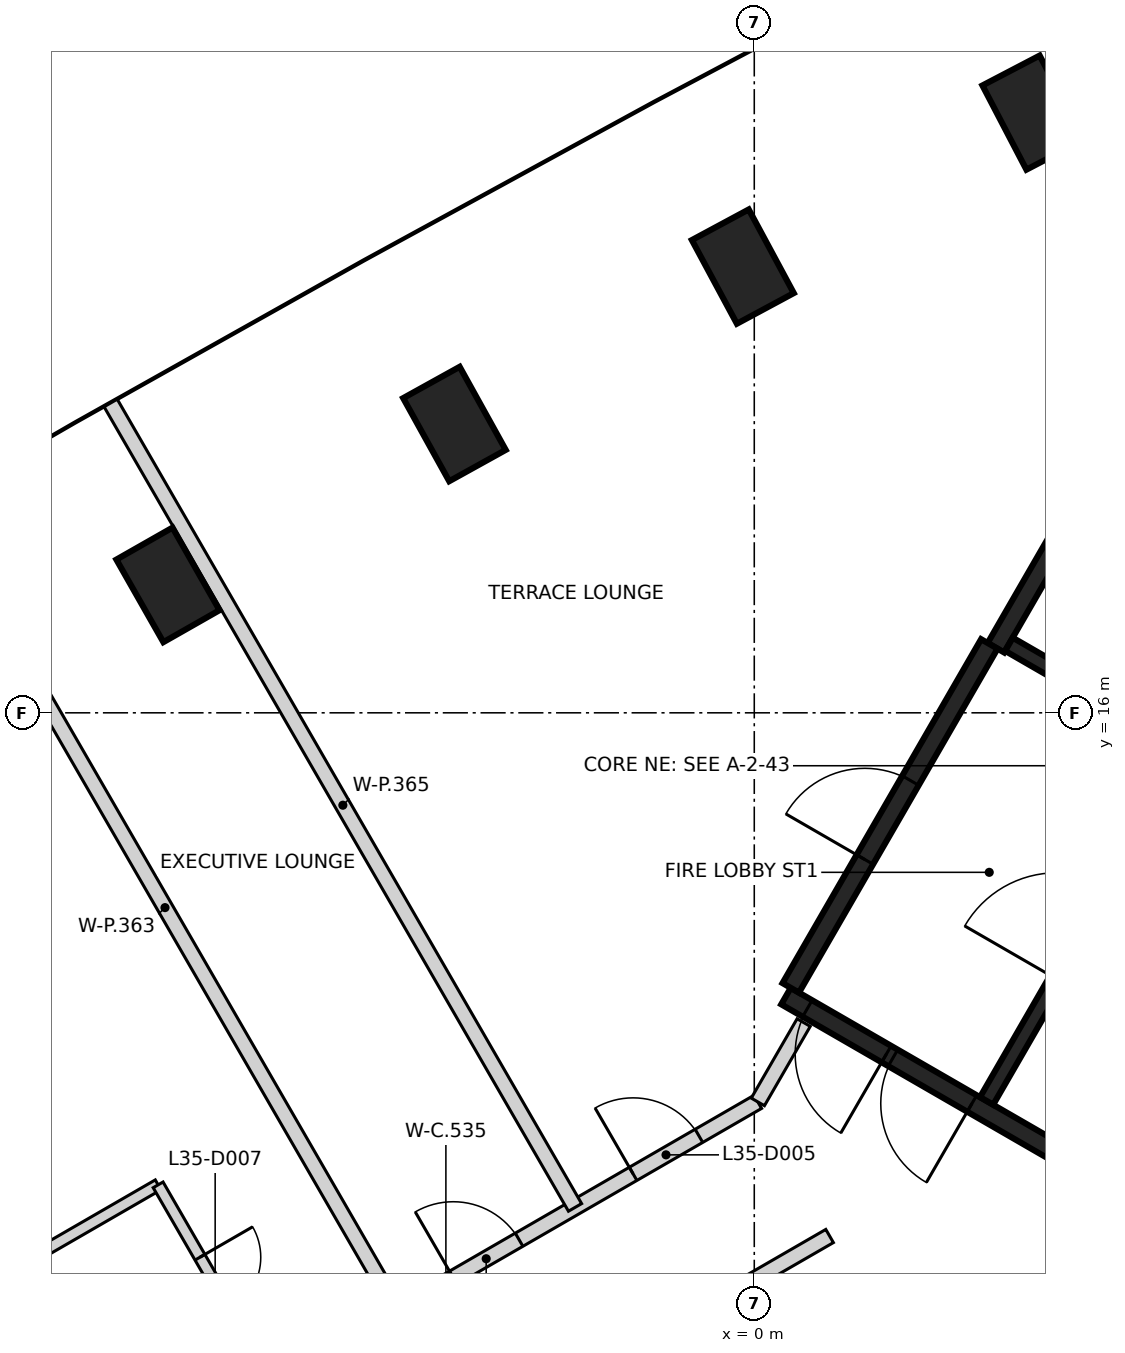
"""IFC4 building model, lengths in metres.
Left out: names, types, materials, properties, quantities, classifications, styles, units other than length and angle.
Written with IfcOpenShell. Run it as: python <this file> out.ifc"""

import sys

from ifc_helpers import new_model, si_unit, direction, frame, frame_2d, origin, origin_2d, place, context, subcontext, project, spatial, rectangle, extrude, element, fill, save


model = new_model("IFC4")
c1 = context("Model", 3, precision=1e-05, world=origin(), true_north=direction((0.0, 1.0)))
c2 = subcontext(c1, "Body", "Model", "MODEL_VIEW")
j1 = project(units=[si_unit("LENGTHUNIT", "METRE"), si_unit("PLANEANGLEUNIT", "RADIAN")], contexts=[c1])
p1 = place(None, origin())
s1 = spatial("IfcSite", under=j1, at=p1, CompositionType="ELEMENT")
p2 = place(p1, origin())
s2 = spatial("IfcBuilding", under=s1, at=p2, CompositionType="ELEMENT")
p3 = place(p2, frame((0.0, 0.0, 143.2)))
s3 = spatial("IfcBuildingStorey", under=s2, at=p3, CompositionType="ELEMENT", Elevation=143.2)
for number, where, z_axis, x_axis in (
    (1, (3.667, 23.896, -0.4), (0.0, 0.0, 1.0), (-0.463, 0.886, 0.0)),
    (2, (-0.151, 21.871, -0.4), (0.0, 0.0, 1.0), (-0.474, 0.881, 0.0)),
    (3, (-3.945, 19.8, -0.4), (0.0, 0.0, 1.0), (-0.485, 0.875, 0.0)),
    (4, (-7.714, 17.683, -0.4), (0.0, 0.0, 1.0), (-0.495, 0.869, 0.0)),
):
    element("IfcColumn", number, at=place(p3, frame(where, z_axis=z_axis, x_axis=x_axis)), inside=s3, PredefinedType="COLUMN", context=c2, shape_type="SweptSolid", body=[
        extrude(rectangle(XDim=1.25, YDim=0.85, at=origin_2d()), origin(), (0.0, 0.0, 1.0), 3.6),
    ])
p4 = place(p3, frame((10.42, 6.498, 0.0), z_axis=(0.0, 0.0, 1.0), x_axis=(-0.866021906294, 0.500006057782, 0.0)))
e5 = element("IfcWall", 5, at=p4, inside=s3, PredefinedType="SHEAR", context=c2, shape_type="SweptSolid", body=[
    extrude(rectangle(XDim=11.55, YDim=0.25, at=frame_2d((5.775, 0.0))), origin(), (0.0, 0.0, 1.0), 3.2),
])
p5 = place(p4, frame((10.025, 0.0, 0.0)))
e6 = element("IfcOpeningElement", 6, at=p5, cuts=e5, PredefinedType="OPENING", context=c2, shape_type="SweptSolid", body=[
    extrude(rectangle(XDim=1.2, YDim=2.1, at=frame_2d((0.6, 1.05))), frame((0.0, 0.135, 0.0), z_axis=(0.0, -1.0, 0.0), x_axis=(1.0, 0.0, 0.0)), (0.0, 0.0, 1.0), 0.27),
])
p6 = place(p4, frame((8.725, 0.0, 0.0)))
e7 = element("IfcOpeningElement", 7, at=p6, cuts=e5, PredefinedType="OPENING", context=c2, shape_type="SweptSolid", body=[
    extrude(rectangle(XDim=1.2, YDim=2.1, at=frame_2d((0.6, 1.05))), frame((0.0, 0.135, 0.0), z_axis=(0.0, -1.0, 0.0), x_axis=(1.0, 0.0, 0.0)), (0.0, 0.0, 1.0), 0.27),
])
p7 = place(p3, frame((3.179, 16.856, 0.0), z_axis=(0.0, 0.0, 1.0), x_axis=(0.500004234368, 0.866022959057, 0.0)))
e8 = element("IfcWall", 8, at=p7, inside=s3, PredefinedType="SHEAR", context=c2, shape_type="SweptSolid", body=[
    extrude(rectangle(XDim=6.25, YDim=0.25, at=frame_2d((3.125, 0.0))), origin(), (0.0, 0.0, 1.0), 3.2),
])
p8 = place(p3, frame((0.48, 12.381, 0.0), z_axis=(0.0, 0.0, 1.0), x_axis=(0.49999885962, 0.866026062182, 0.0)))
e9 = element("IfcWall", 9, at=p8, inside=s3, PredefinedType="SHEAR", context=c2, shape_type="SweptSolid", body=[
    extrude(rectangle(XDim=5.225, YDim=0.25, at=frame_2d((2.612, 0.0))), origin(), (0.0, 0.0, 1.0), 3.2),
])
p9 = place(p8, frame((1.95, 0.0, 0.0)))
e10 = element("IfcOpeningElement", 10, at=p9, cuts=e9, PredefinedType="OPENING", context=c2, shape_type="SweptSolid", body=[
    extrude(rectangle(XDim=1.2, YDim=2.1, at=frame_2d((0.6, 1.05))), frame((0.0, 0.135, 0.0), z_axis=(0.0, -1.0, 0.0), x_axis=(1.0, 0.0, 0.0)), (0.0, 0.0, 1.0), 0.27),
])
p10 = place(p3, frame((3.057, 10.895, 0.0), z_axis=(0.0, 0.0, 1.0), x_axis=(0.499989418164, 0.866031513124, 0.0)))
e11 = element("IfcWall", 11, at=p10, inside=s3, PredefinedType="SHEAR", context=c2, shape_type="SweptSolid", body=[
    extrude(rectangle(XDim=5.251, YDim=0.2, at=frame_2d((2.625, 0.0))), origin(), (0.0, 0.0, 1.0), 3.2),
])
p11 = place(p10, frame((1.849, 0.0, 0.0)))
e12 = element("IfcOpeningElement", 12, at=p11, cuts=e11, PredefinedType="OPENING", context=c2, shape_type="SweptSolid", body=[
    extrude(rectangle(XDim=1.4, YDim=2.1, at=frame_2d((0.7, 1.05))), frame((0.0, 0.11, 0.0), z_axis=(0.0, -1.0, 0.0), x_axis=(1.0, 0.0, 0.0)), (0.0, 0.0, 1.0), 0.22),
])
p12 = place(p3, frame((5.725, 15.531, 0.0), z_axis=(0.0, 0.0, 1.0), x_axis=(-0.866037306777, 0.499979382845, 0.0)))
e13 = element("IfcWall", 13, at=p12, inside=s3, PredefinedType="SHEAR", context=c2, shape_type="SweptSolid", body=[
    extrude(rectangle(XDim=2.742, YDim=0.2, at=frame_2d((1.371, 0.0))), origin(), (0.0, 0.0, 1.0), 3.2),
])
p13 = place(p12, frame((0.743, 0.0, 0.0)))
e14 = element("IfcOpeningElement", 14, at=p13, cuts=e13, PredefinedType="OPENING", context=c2, shape_type="SweptSolid", body=[
    extrude(rectangle(XDim=1.3, YDim=2.1, at=frame_2d((0.65, 1.05))), frame((0.0, 0.11, 0.0), z_axis=(0.0, -1.0, 0.0), x_axis=(1.0, 0.0, 0.0)), (0.0, 0.0, 1.0), 0.22),
])
p14 = place(p3, frame((-16.026, 10.245, 0.0), z_axis=(0.0, 0.0, 1.0), x_axis=(0.937607706988, -0.347694963721, 0.0)))
e15 = element("IfcWall", 15, at=p14, inside=s3, PredefinedType="PARTITIONING", context=c2, shape_type="SweptSolid", body=[
    extrude(rectangle(XDim=7.458, YDim=0.2, at=frame_2d((3.729, 0.0))), origin(), (0.0, 0.0, 1.0), 3.2),
])
p15 = place(p14, frame((6.179, 0.0, 0.0)))
e16 = element("IfcOpeningElement", 16, at=p15, cuts=e15, PredefinedType="OPENING", context=c2, shape_type="SweptSolid", body=[
    extrude(rectangle(XDim=0.95, YDim=2.1, at=frame_2d((0.475, 1.05))), frame((0.0, 0.11, 0.0), z_axis=(0.0, -1.0, 0.0), x_axis=(1.0, 0.0, 0.0)), (0.0, 0.0, 1.0), 0.22),
])
p16 = place(p14, frame((2.139, 0.0, 0.0)))
e17 = element("IfcOpeningElement", 17, at=p16, cuts=e15, PredefinedType="OPENING", context=c2, shape_type="SweptSolid", body=[
    extrude(rectangle(XDim=1.0, YDim=2.1, at=frame_2d((0.5, 1.05))), frame((0.0, 0.11, 0.0), z_axis=(0.0, -1.0, 0.0), x_axis=(1.0, 0.0, 0.0)), (0.0, 0.0, 1.0), 0.22),
])
p17 = place(p3, frame((-8.382, 3.705, 0.0), z_axis=(0.0, 0.0, 1.0), x_axis=(0.866012036978, 0.500023151273, 0.0)))
e18 = element("IfcWall", 18, at=p17, inside=s3, PredefinedType="PARTITIONING", context=c2, shape_type="SweptSolid", body=[
    extrude(rectangle(XDim=10.823, YDim=0.2, at=frame_2d((5.412, 0.0))), origin(), (0.0, 0.0, 1.0), 3.2),
])
p18 = place(p17, frame((7.661, 0.0, 0.0)))
e19 = element("IfcOpeningElement", 19, at=p18, cuts=e18, PredefinedType="OPENING", context=c2, shape_type="SweptSolid", body=[
    extrude(rectangle(XDim=0.9, YDim=2.1, at=frame_2d((0.45, 1.05))), frame((0.0, 0.11, 0.0), z_axis=(0.0, -1.0, 0.0), x_axis=(1.0, 0.0, 0.0)), (0.0, 0.0, 1.0), 0.22),
])
p19 = place(p17, frame((2.261, 0.0, 0.0)))
e20 = element("IfcOpeningElement", 20, at=p19, cuts=e18, PredefinedType="OPENING", context=c2, shape_type="SweptSolid", body=[
    extrude(rectangle(XDim=0.9, YDim=2.1, at=frame_2d((0.45, 1.05))), frame((0.0, 0.11, 0.0), z_axis=(0.0, -1.0, 0.0), x_axis=(1.0, 0.0, 0.0)), (0.0, 0.0, 1.0), 0.22),
])
p20 = place(p3, frame((-8.161, 6.142, 0.0), z_axis=(0.0, 0.0, 1.0), x_axis=(0.865927304867, 0.500169873828, 0.0)))
e21 = element("IfcWall", 21, at=p20, inside=s3, PredefinedType="PARTITIONING", context=c2, shape_type="SweptSolid", body=[
    extrude(rectangle(XDim=9.478, YDim=0.2, at=frame_2d((4.739, 0.0))), origin(), (0.0, 0.0, 1.0), 3.2),
])
p21 = place(p20, frame((4.851, 0.0, 0.0)))
e22 = element("IfcOpeningElement", 22, at=p21, cuts=e21, PredefinedType="OPENING", context=c2, shape_type="SweptSolid", body=[
    extrude(rectangle(XDim=1.0, YDim=2.1, at=frame_2d((0.5, 1.05))), frame((0.0, 0.11, 0.0), z_axis=(0.0, -1.0, 0.0), x_axis=(1.0, 0.0, 0.0)), (0.0, 0.0, 1.0), 0.22),
])
p22 = place(p20, frame((7.583, 0.0, 0.0)))
e23 = element("IfcOpeningElement", 23, at=p22, cuts=e21, PredefinedType="OPENING", context=c2, shape_type="SweptSolid", body=[
    extrude(rectangle(XDim=1.0, YDim=2.1, at=frame_2d((0.5, 1.05))), frame((0.0, 0.11, 0.0), z_axis=(0.0, -1.0, 0.0), x_axis=(1.0, 0.0, 0.0)), (0.0, 0.0, 1.0), 0.22),
])
p23 = place(p3, frame((0.047, 10.881, 0.0), z_axis=(0.0, 0.0, 1.0), x_axis=(0.500038011057, 0.866003456978, 0.0)))
e24 = element("IfcWall", 24, at=p23, inside=s3, PredefinedType="PARTITIONING", context=c2, shape_type="SweptSolid", body=[
    extrude(rectangle(XDim=1.206, YDim=0.2, at=frame_2d((0.603, 0.0))), origin(), (0.0, 0.0, 1.0), 3.2),
])
p24 = place(p3, frame((-10.809, 18.731, 0.0), z_axis=(0.0, 0.0, 1.0), x_axis=(0.500004774777, -0.866022647048, 0.0)))
e25 = element("IfcWall", 25, at=p24, inside=s3, PredefinedType="PARTITIONING", context=c2, shape_type="SweptSolid", body=[
    extrude(rectangle(XDim=12.227, YDim=0.2, at=frame_2d((6.113, 0.0))), origin(), (0.0, 0.0, 1.0), 2.3),
])
p25 = place(p3, frame((-8.468, 20.076, 0.0), z_axis=(0.0, 0.0, 1.0), x_axis=(0.499961688474, -0.866047521824, 0.0)))
e26 = element("IfcWall", 26, at=p25, inside=s3, PredefinedType="PARTITIONING", context=c2, shape_type="SweptSolid", body=[
    extrude(rectangle(XDim=12.22, YDim=0.2, at=frame_2d((6.11, 0.0))), origin(), (0.0, 0.0, 1.0), 2.3),
])
p26 = place(p3, frame((-9.661, 8.74, 0.0), z_axis=(0.0, 0.0, 1.0), x_axis=(0.49990192124, -0.866082022179, 0.0)))
e27 = element("IfcWall", 27, at=p26, inside=s3, PredefinedType="PARTITIONING", context=c2, shape_type="SweptSolid", body=[
    extrude(rectangle(XDim=1.256, YDim=0.15, at=frame_2d((0.628, 0.0))), origin(), (0.0, 0.0, 1.0), 3.2),
])
p27 = place(p3, frame((-9.661, 8.74, 0.0), z_axis=(0.0, 0.0, 1.0), x_axis=(0.865922159541, 0.500178781653, 0.0)))
e28 = element("IfcWall", 28, at=p27, inside=s3, PredefinedType="PARTITIONING", context=c2, shape_type="SweptSolid", body=[
    extrude(rectangle(XDim=2.099, YDim=0.15, at=frame_2d((1.05, 0.0))), origin(), (0.0, 0.0, 1.0), 3.2),
])
p28 = place(p3, frame((-7.843, 9.79, 0.0), z_axis=(0.0, 0.0, 1.0), x_axis=(0.500234218456, -0.865890135459, 0.0)))
e29 = element("IfcWall", 29, at=p28, inside=s3, PredefinedType="PARTITIONING", context=c2, shape_type="SweptSolid", body=[
    extrude(rectangle(XDim=3.0, YDim=0.15, at=frame_2d((1.5, 0.0))), origin(), (0.0, 0.0, 1.0), 3.2),
])
p29 = place(p28, frame((1.1, 0.0, 0.0)))
e30 = element("IfcOpeningElement", 30, at=p29, cuts=e29, PredefinedType="OPENING", context=c2, shape_type="SweptSolid", body=[
    extrude(rectangle(XDim=0.8, YDim=2.1, at=frame_2d((0.4, 1.05))), frame((0.0, 0.085, 0.0), z_axis=(0.0, -1.0, 0.0), x_axis=(1.0, 0.0, 0.0)), (0.0, 0.0, 1.0), 0.17),
])
p30 = place(p5, origin())
e31 = element("IfcDoor", 31, at=p30, inside=s3, OperationType="SINGLE_SWING_LEFT", PredefinedType="DOOR", context=c2, shape_type="SweptSolid", body=[
    extrude(rectangle(XDim=1.2, YDim=2.1, at=frame_2d((0.6, 1.05))), frame((0.0, 0.025, 0.0), z_axis=(0.0, -1.0, 0.0), x_axis=(1.0, 0.0, 0.0)), (0.0, 0.0, 1.0), 0.05),
])
fill(e6, e31)
p31 = place(p6, origin())
e32 = element("IfcDoor", 32, at=p31, inside=s3, OperationType="SINGLE_SWING_RIGHT", PredefinedType="DOOR", context=c2, shape_type="SweptSolid", body=[
    extrude(rectangle(XDim=1.2, YDim=2.1, at=frame_2d((0.6, 1.05))), frame((0.0, 0.025, 0.0), z_axis=(0.0, -1.0, 0.0), x_axis=(1.0, 0.0, 0.0)), (0.0, 0.0, 1.0), 0.05),
])
fill(e7, e32)
p32 = place(p9, origin())
e33 = element("IfcDoor", 33, at=p32, inside=s3, OperationType="SINGLE_SWING_RIGHT", PredefinedType="DOOR", context=c2, shape_type="SweptSolid", body=[
    extrude(rectangle(XDim=1.2, YDim=2.1, at=frame_2d((0.6, 1.05))), frame((0.0, 0.025, 0.0), z_axis=(0.0, -1.0, 0.0), x_axis=(1.0, 0.0, 0.0)), (0.0, 0.0, 1.0), 0.05),
])
fill(e10, e33)
p33 = place(p21, origin())
e34 = element("IfcDoor", 34, at=p33, inside=s3, OperationType="SINGLE_SWING_LEFT", PredefinedType="DOOR", context=c2, shape_type="SweptSolid", body=[
    extrude(rectangle(XDim=1.0, YDim=2.1, at=frame_2d((0.5, 1.05))), frame((0.0, 0.025, 0.0), z_axis=(0.0, -1.0, 0.0), x_axis=(1.0, 0.0, 0.0)), (0.0, 0.0, 1.0), 0.05),
])
fill(e22, e34)
p34 = place(p22, origin())
e35 = element("IfcDoor", 35, at=p34, inside=s3, OperationType="SINGLE_SWING_LEFT", PredefinedType="DOOR", context=c2, shape_type="SweptSolid", body=[
    extrude(rectangle(XDim=1.0, YDim=2.1, at=frame_2d((0.5, 1.05))), frame((0.0, 0.025, 0.0), z_axis=(0.0, -1.0, 0.0), x_axis=(1.0, 0.0, 0.0)), (0.0, 0.0, 1.0), 0.05),
])
fill(e23, e35)
p35 = place(p29, frame((0.8, 0.0, 0.0), z_axis=(0.0, 0.0, 1.0), x_axis=(-1.0, 0.0, 0.0)))
e36 = element("IfcDoor", 36, at=p35, inside=s3, OperationType="SINGLE_SWING_LEFT", PredefinedType="DOOR", context=c2, shape_type="SweptSolid", body=[
    extrude(rectangle(XDim=0.8, YDim=2.1, at=frame_2d((0.4, 1.05))), frame((0.0, 0.025, 0.0), z_axis=(0.0, -1.0, 0.0), x_axis=(1.0, 0.0, 0.0)), (0.0, 0.0, 1.0), 0.05),
])
fill(e30, e36)
save(model, sys.argv[1])
